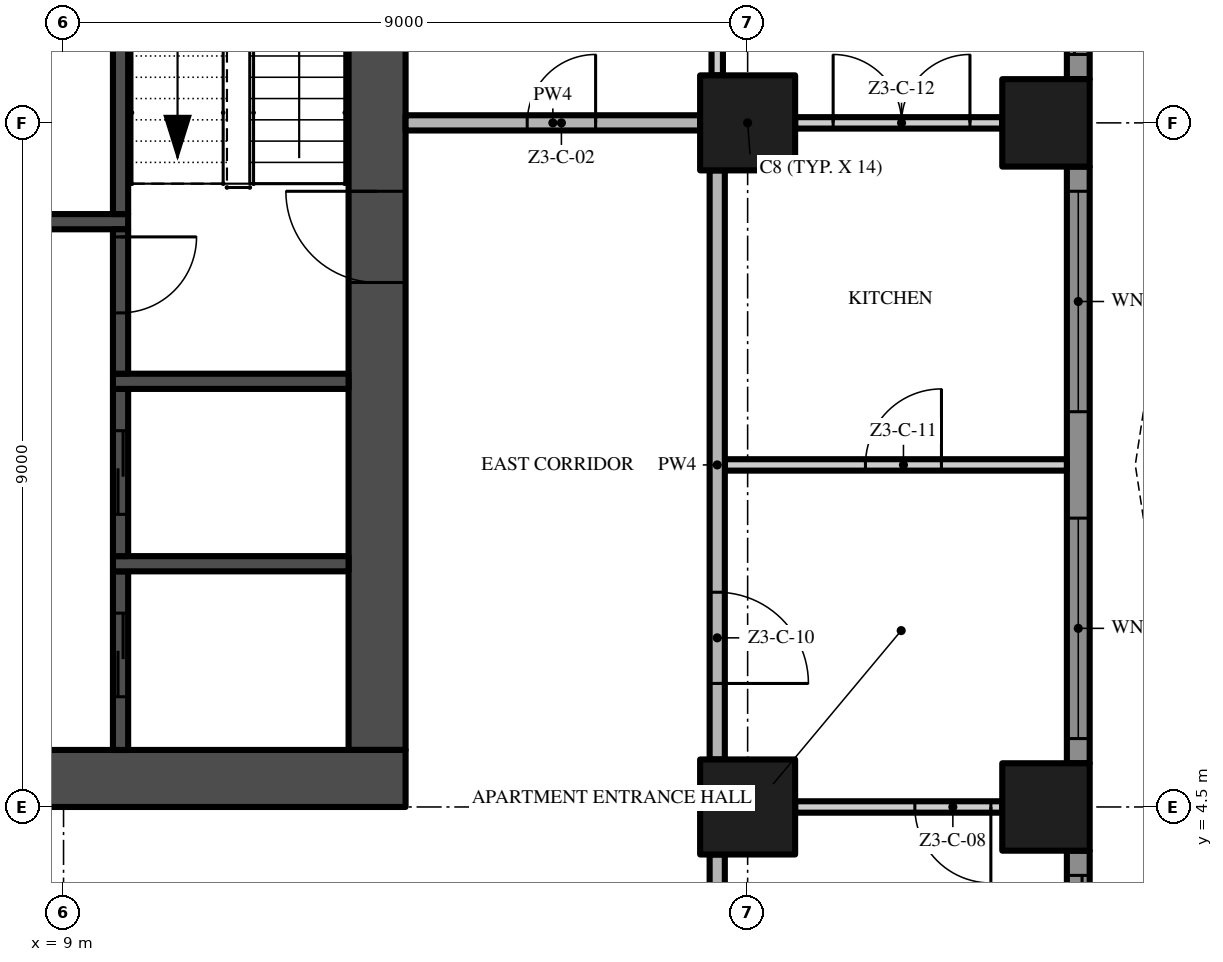
"""IFC4 building model, lengths in metres.
Left out: names, types, materials, properties, quantities, classifications, styles, units other than length and angle.
Written with IfcOpenShell. Run it as: python <this file> out.ifc"""

import sys

from ifc_helpers import new_model, si_unit, direction, frame, frame_2d, origin, origin_2d, place, context, subcontext, project, spatial, polyline, rectangle, outline, extrude, element, fill, save


model = new_model("IFC4")
c1 = context("Model", 3, precision=1e-05, world=origin(), true_north=direction((0.0, 1.0)))
c2 = subcontext(c1, "Body", "Model", "MODEL_VIEW")
j1 = project(units=[si_unit("LENGTHUNIT", "METRE"), si_unit("PLANEANGLEUNIT", "RADIAN")], contexts=[c1])
p1 = place(None, origin())
s1 = spatial("IfcSite", under=j1, at=p1, CompositionType="ELEMENT")
p2 = place(p1, origin())
s2 = spatial("IfcBuilding", under=s1, at=p2, CompositionType="ELEMENT")
p3 = place(p2, frame((0.0, 0.0, 151.6)))
s3 = spatial("IfcBuildingStorey", under=s2, at=p3, CompositionType="ELEMENT", Elevation=151.6)
p4 = place(p3, frame((-13.5, 4.875, -0.3), z_axis=(0.0, 0.0, 1.0), x_axis=(1.0, 0.0, 0.0)))
e1 = element("IfcWall", 1, at=p4, inside=s3, PredefinedType="SHEAR", context=c2, shape_type="SweptSolid", body=[
    extrude(rectangle(XDim=27.0, YDim=0.75, at=frame_2d((13.5, 0.0))), origin(), (0.0, 0.0, 1.0), 3.8),
])
p5 = place(p4, frame((12.0, 0.0, 0.3)))
e2 = element("IfcOpeningElement", 2, at=p5, cuts=e1, PredefinedType="OPENING", context=c2, shape_type="SweptSolid", body=[
    extrude(rectangle(XDim=3.0, YDim=2.4, at=frame_2d((1.5, 1.2))), frame((0.0, 0.385, 0.0), z_axis=(0.0, -1.0, 0.0), x_axis=(1.0, 0.0, 0.0)), (0.0, 0.0, 1.0), 0.77),
])
p6 = place(p4, frame((4.9, 0.0, 0.3)))
e3 = element("IfcOpeningElement", 3, at=p6, cuts=e1, PredefinedType="OPENING", context=c2, shape_type="SweptSolid", body=[
    extrude(rectangle(XDim=1.2, YDim=2.2, at=frame_2d((0.6, 1.1))), frame((0.0, 0.385, 0.0), z_axis=(0.0, -1.0, 0.0), x_axis=(1.0, 0.0, 0.0)), (0.0, 0.0, 1.0), 0.77),
])
p7 = place(p4, frame((20.75, 0.0, 0.3)))
e4 = element("IfcOpeningElement", 4, at=p7, cuts=e1, PredefinedType="OPENING", context=c2, shape_type="SweptSolid", body=[
    extrude(rectangle(XDim=1.5, YDim=2.2, at=frame_2d((0.75, 1.1))), frame((0.0, 0.385, 0.0), z_axis=(0.0, -1.0, 0.0), x_axis=(1.0, 0.0, 0.0)), (0.0, 0.0, 1.0), 0.77),
])
p8 = place(p4, frame((17.4, 0.0, 0.3)))
e5 = element("IfcOpeningElement", 5, at=p8, cuts=e1, PredefinedType="OPENING", context=c2, shape_type="SweptSolid", body=[
    extrude(rectangle(XDim=1.2, YDim=2.2, at=frame_2d((0.6, 1.1))), frame((0.0, 0.385, 0.0), z_axis=(0.0, -1.0, 0.0), x_axis=(1.0, 0.0, 0.0)), (0.0, 0.0, 1.0), 0.77),
])
p9 = place(p3, frame((13.125, 5.25, -0.3), z_axis=(0.0, 0.0, 1.0), x_axis=(0.0, 1.0, 0.0)))
e6 = element("IfcWall", 6, at=p9, inside=s3, PredefinedType="SHEAR", context=c2, shape_type="SweptSolid", body=[
    extrude(rectangle(XDim=16.5, YDim=0.75, at=frame_2d((8.25, 0.0))), origin(), (0.0, 0.0, 1.0), 3.8),
])
p10 = place(p9, frame((6.15, 0.0, 0.3)))
e7 = element("IfcOpeningElement", 7, at=p10, cuts=e6, PredefinedType="OPENING", context=c2, shape_type="SweptSolid", body=[
    extrude(rectangle(XDim=1.2, YDim=2.2, at=frame_2d((0.6, 1.1))), frame((0.0, 0.385, 0.0), z_axis=(0.0, -1.0, 0.0), x_axis=(1.0, 0.0, 0.0)), (0.0, 0.0, 1.0), 0.77),
])
for number, where, z_axis, x_axis in (
    (8, (18.0, 13.5, 0.0), (0.0, 0.0, 1.0), (1.0, 0.0, 0.0)),
    (9, (18.0, 4.5, 0.0), (0.0, 0.0, 1.0), (1.0, 0.0, 0.0)),
):
    element("IfcColumn", number, at=place(p3, frame(where, z_axis=z_axis, x_axis=x_axis)), inside=s3, PredefinedType="COLUMN", context=c2, shape_type="SweptSolid", body=[
        extrude(rectangle(XDim=1.25, YDim=1.25, at=origin_2d()), origin(), (0.0, 0.0, 1.0), 3.5),
    ])
for number, where, z_axis, x_axis in (
    (10, (21.925, 13.5, 0.0), (0.0, 0.0, 1.0), (1.0, 0.0, 0.0)),
    (11, (21.925, 4.5, 0.0), (0.0, 0.0, 1.0), (1.0, 0.0, 0.0)),
):
    element("IfcColumn", number, at=place(p3, frame(where, z_axis=z_axis, x_axis=x_axis)), inside=s3, PredefinedType="COLUMN", context=c2, shape_type="SweptSolid", body=[
        extrude(rectangle(XDim=1.15, YDim=1.15, at=origin_2d()), origin(), (0.0, 0.0, 1.0), 3.5),
    ])
p11 = place(p3, frame((22.35, 3.925, 0.0), z_axis=(0.0, 0.0, 1.0), x_axis=(0.0, -1.0, 0.0)))
e12 = element("IfcWall", 12, at=p11, inside=s3, PredefinedType="SOLIDWALL", context=c2, shape_type="SweptSolid", body=[
    extrude(rectangle(XDim=7.85, YDim=0.3, at=frame_2d((3.925, 0.0))), origin(), (0.0, 0.0, 1.0), 3.5),
])
p12 = place(p11, frame((4.625, 0.0, 0.45)))
e13 = element("IfcOpeningElement", 13, at=p12, cuts=e12, PredefinedType="OPENING", context=c2, shape_type="SweptSolid", body=[
    extrude(rectangle(XDim=2.9, YDim=2.65, at=frame_2d((1.45, 1.325))), frame((0.0, 0.16, 0.0), z_axis=(0.0, -1.0, 0.0), x_axis=(1.0, 0.0, 0.0)), (0.0, 0.0, 1.0), 0.32),
])
p13 = place(p11, frame((0.325, 0.0, 0.0)))
e14 = element("IfcOpeningElement", 14, at=p13, cuts=e12, PredefinedType="OPENING", context=c2, shape_type="SweptSolid", body=[
    extrude(rectangle(XDim=2.9, YDim=2.4, at=frame_2d((1.45, 1.2))), frame((0.0, 0.16, 0.0), z_axis=(0.0, -1.0, 0.0), x_axis=(1.0, 0.0, 0.0)), (0.0, 0.0, 1.0), 0.32),
])
p14 = place(p3, frame((22.35, 12.925, 0.0), z_axis=(0.0, 0.0, 1.0), x_axis=(0.0, -1.0, 0.0)))
e15 = element("IfcWall", 15, at=p14, inside=s3, PredefinedType="SOLIDWALL", context=c2, shape_type="SweptSolid", body=[
    extrude(rectangle(XDim=7.85, YDim=0.3, at=frame_2d((3.925, 0.0))), origin(), (0.0, 0.0, 1.0), 3.5),
])
p15 = place(p14, frame((4.625, 0.0, 0.45)))
e16 = element("IfcOpeningElement", 16, at=p15, cuts=e15, PredefinedType="OPENING", context=c2, shape_type="SweptSolid", body=[
    extrude(rectangle(XDim=2.9, YDim=2.65, at=frame_2d((1.45, 1.325))), frame((0.0, 0.16, 0.0), z_axis=(0.0, -1.0, 0.0), x_axis=(1.0, 0.0, 0.0)), (0.0, 0.0, 1.0), 0.32),
])
p16 = place(p14, frame((0.325, 0.0, 0.45)))
e17 = element("IfcOpeningElement", 17, at=p16, cuts=e15, PredefinedType="OPENING", context=c2, shape_type="SweptSolid", body=[
    extrude(rectangle(XDim=2.9, YDim=2.65, at=frame_2d((1.45, 1.325))), frame((0.0, 0.16, 0.0), z_axis=(0.0, -1.0, 0.0), x_axis=(1.0, 0.0, 0.0)), (0.0, 0.0, 1.0), 0.32),
])
p17 = place(p3, frame((22.35, 18.0, 0.0), z_axis=(0.0, 0.0, 1.0), x_axis=(0.0, -1.0, 0.0)))
e18 = element("IfcWall", 18, at=p17, inside=s3, PredefinedType="SOLIDWALL", context=c2, shape_type="SweptSolid", body=[
    extrude(rectangle(XDim=3.925, YDim=0.3, at=frame_2d((1.962, 0.0))), origin(), (0.0, 0.0, 1.0), 3.5),
])
p18 = place(p17, frame((0.7, 0.0, 0.0)))
e19 = element("IfcOpeningElement", 19, at=p18, cuts=e18, PredefinedType="OPENING", context=c2, shape_type="SweptSolid", body=[
    extrude(rectangle(XDim=2.9, YDim=2.4, at=frame_2d((1.45, 1.2))), frame((0.0, 0.16, 0.0), z_axis=(0.0, -1.0, 0.0), x_axis=(1.0, 0.0, 0.0)), (0.0, 0.0, 1.0), 0.32),
])
p19 = place(p3, origin())
e20 = element("IfcWall", 20, at=p19, inside=s3, PredefinedType="USERDEFINED", context=c2, shape_type="SweptSolid", body=[
    extrude(outline(polyline([(25.5, -13.5), (25.271, -12.0), (24.671, -10.5), (23.929, -9.0), (23.329, -7.5), (23.1, -6.0), (23.329, -4.5), (23.929, -3.0), (24.671, -1.5), (25.271, 0.0), (25.5, 1.5), (25.271, 3.0), (24.671, 4.5), (23.929, 6.0), (23.329, 7.5), (23.1, 9.0), (23.329, 10.5), (23.929, 12.0), (24.671, 13.5), (25.271, 15.0), (25.5, 16.5), (25.271, 18.0), (25.024, 17.962), (25.247, 16.5), (25.028, 15.066), (24.442, 13.602), (23.701, 12.102), (23.086, 10.566), (22.847, 9.0), (23.086, 7.434), (23.701, 5.898), (24.442, 4.398), (25.028, 2.934), (25.247, 1.5), (25.028, 0.066), (24.442, -1.398), (23.701, -2.898), (23.086, -4.434), (22.847, -6.0), (23.086, -7.566), (23.701, -9.102), (24.442, -10.602), (25.028, -12.066), (25.253, -13.538), (25.5, -13.5)])), origin(), (0.0, 0.0, 1.0), 0.9),
])
p20 = place(p3, frame((6.375, 12.2, 0.0), z_axis=(0.0, 0.0, 1.0), x_axis=(1.0, 0.0, 0.0)))
e21 = element("IfcWall", 21, at=p20, inside=s3, PredefinedType="SHEAR", context=c2, shape_type="SweptSolid", body=[
    extrude(rectangle(XDim=3.475, YDim=0.2, at=frame_2d((1.738, 0.0))), origin(), (0.0, 0.0, 1.0), 3.5),
])
p21 = place(p3, frame((9.75, 5.25, 0.0), z_axis=(0.0, 0.0, 1.0), x_axis=(0.0, 1.0, 0.0)))
e22 = element("IfcWall", 22, at=p21, inside=s3, PredefinedType="SHEAR", context=c2, shape_type="SweptSolid", body=[
    extrude(rectangle(XDim=2.35, YDim=0.2, at=frame_2d((1.175, 0.0))), origin(), (0.0, 0.0, 1.0), 3.5),
])
p22 = place(p21, frame((0.7, 0.0, 0.0)))
e23 = element("IfcOpeningElement", 23, at=p22, cuts=e22, PredefinedType="OPENING", context=c2, shape_type="SweptSolid", body=[
    extrude(rectangle(XDim=1.1, YDim=2.1, at=frame_2d((0.55, 1.05))), frame((0.0, 0.11, 0.0), z_axis=(0.0, -1.0, 0.0), x_axis=(1.0, 0.0, 0.0)), (0.0, 0.0, 1.0), 0.22),
])
p23 = place(p3, frame((9.65, 7.7, 0.0), z_axis=(0.0, 0.0, 1.0), x_axis=(1.0, 0.0, 0.0)))
e24 = element("IfcWall", 24, at=p23, inside=s3, PredefinedType="SHEAR", context=c2, shape_type="SweptSolid", body=[
    extrude(rectangle(XDim=3.1, YDim=0.2, at=frame_2d((1.55, 0.0))), origin(), (0.0, 0.0, 1.0), 3.5),
])
p24 = place(p3, frame((9.75, 7.8, 0.0), z_axis=(0.0, 0.0, 1.0), x_axis=(0.0, 1.0, 0.0)))
e25 = element("IfcWall", 25, at=p24, inside=s3, PredefinedType="SHEAR", context=c2, shape_type="SweptSolid", body=[
    extrude(rectangle(XDim=2.2, YDim=0.2, at=frame_2d((1.1, 0.0))), origin(), (0.0, 0.0, 1.0), 3.5),
])
p25 = place(p24, frame((0.55, 0.0, 0.0)))
e26 = element("IfcOpeningElement", 26, at=p25, cuts=e25, PredefinedType="OPENING", context=c2, shape_type="SweptSolid", body=[
    extrude(rectangle(XDim=1.1, YDim=2.1, at=frame_2d((0.55, 1.05))), frame((0.0, 0.11, 0.0), z_axis=(0.0, -1.0, 0.0), x_axis=(1.0, 0.0, 0.0)), (0.0, 0.0, 1.0), 0.22),
])
p26 = place(p3, frame((9.65, 10.1, 0.0), z_axis=(0.0, 0.0, 1.0), x_axis=(1.0, 0.0, 0.0)))
e27 = element("IfcWall", 27, at=p26, inside=s3, PredefinedType="SHEAR", context=c2, shape_type="SweptSolid", body=[
    extrude(rectangle(XDim=3.1, YDim=0.2, at=frame_2d((1.55, 0.0))), origin(), (0.0, 0.0, 1.0), 3.5),
])
p27 = place(p3, frame((9.75, 12.1, 0.0), z_axis=(0.0, 0.0, 1.0), x_axis=(0.0, -1.0, 0.0)))
e28 = element("IfcWall", 28, at=p27, inside=s3, PredefinedType="SHEAR", context=c2, shape_type="SweptSolid", body=[
    extrude(rectangle(XDim=1.9, YDim=0.2, at=frame_2d((0.95, 0.0))), origin(), (0.0, 0.0, 1.0), 3.5),
])
p28 = place(p27, frame((0.1, 0.0, 0.0)))
e29 = element("IfcOpeningElement", 29, at=p28, cuts=e28, PredefinedType="OPENING", context=c2, shape_type="SweptSolid", body=[
    extrude(rectangle(XDim=1.0, YDim=2.2, at=frame_2d((0.5, 1.1))), frame((0.0, 0.11, 0.0), z_axis=(0.0, -1.0, 0.0), x_axis=(1.0, 0.0, 0.0)), (0.0, 0.0, 1.0), 0.22),
])
p29 = place(p3, frame((9.75, 12.3, 0.0), z_axis=(0.0, 0.0, 1.0), x_axis=(0.0, 1.0, 0.0)))
e30 = element("IfcWall", 30, at=p29, inside=s3, PredefinedType="SHEAR", context=c2, shape_type="SweptSolid", body=[
    extrude(rectangle(XDim=3.6, YDim=0.2, at=frame_2d((1.8, 0.0))), origin(), (0.0, 0.0, 1.0), 3.5),
])
p30 = place(p3, frame((21.35, 4.5, 0.0), z_axis=(0.0, 0.0, 1.0), x_axis=(-1.0, 0.0, 0.0)))
e31 = element("IfcWall", 31, at=p30, inside=s3, PredefinedType="PARTITIONING", context=c2, shape_type="SweptSolid", body=[
    extrude(rectangle(XDim=2.725, YDim=0.15, at=frame_2d((1.363, 0.0))), origin(), (0.0, 0.0, 1.0), 3.5),
])
p31 = place(p30, frame((0.15, 0.0, 0.0)))
e32 = element("IfcOpeningElement", 32, at=p31, cuts=e31, PredefinedType="OPENING", context=c2, shape_type="SweptSolid", body=[
    extrude(rectangle(XDim=1.0, YDim=2.4, at=frame_2d((0.5, 1.2))), frame((0.0, 0.085, 0.0), z_axis=(0.0, -1.0, 0.0), x_axis=(1.0, 0.0, 0.0)), (0.0, 0.0, 1.0), 0.17),
])
p32 = place(p3, frame((17.7, 9.0, 0.0), z_axis=(0.0, 0.0, 1.0), x_axis=(1.0, 0.0, 0.0)))
e33 = element("IfcWall", 33, at=p32, inside=s3, PredefinedType="PARTITIONING", context=c2, shape_type="SweptSolid", body=[
    extrude(rectangle(XDim=4.5, YDim=0.15, at=frame_2d((2.25, 0.0))), origin(), (0.0, 0.0, 1.0), 3.5),
])
p33 = place(p32, frame((1.85, 0.0, 0.0)))
e34 = element("IfcOpeningElement", 34, at=p33, cuts=e33, PredefinedType="OPENING", context=c2, shape_type="SweptSolid", body=[
    extrude(rectangle(XDim=1.0, YDim=2.4, at=frame_2d((0.5, 1.2))), frame((0.0, 0.085, 0.0), z_axis=(0.0, -1.0, 0.0), x_axis=(1.0, 0.0, 0.0)), (0.0, 0.0, 1.0), 0.17),
])
p34 = place(p3, frame((13.5, 13.5, 0.0), z_axis=(0.0, 0.0, 1.0), x_axis=(1.0, 0.0, 0.0)))
e35 = element("IfcWall", 35, at=p34, inside=s3, PredefinedType="PARTITIONING", context=c2, shape_type="SweptSolid", body=[
    extrude(rectangle(XDim=3.875, YDim=0.2, at=frame_2d((1.938, 0.0))), origin(), (0.0, 0.0, 1.0), 3.5),
])
p35 = place(p34, frame((1.6, 0.0, 0.0)))
e36 = element("IfcOpeningElement", 36, at=p35, cuts=e35, PredefinedType="OPENING", context=c2, shape_type="SweptSolid", body=[
    extrude(rectangle(XDim=0.9, YDim=2.1, at=frame_2d((0.45, 1.05))), frame((0.0, 0.11, 0.0), z_axis=(0.0, -1.0, 0.0), x_axis=(1.0, 0.0, 0.0)), (0.0, 0.0, 1.0), 0.22),
])
p36 = place(p3, frame((18.625, 13.5, 0.0), z_axis=(0.0, 0.0, 1.0), x_axis=(1.0, 0.0, 0.0)))
e37 = element("IfcWall", 37, at=p36, inside=s3, PredefinedType="PARTITIONING", context=c2, shape_type="SweptSolid", body=[
    extrude(rectangle(XDim=2.725, YDim=0.15, at=frame_2d((1.363, 0.0))), origin(), (0.0, 0.0, 1.0), 3.5),
])
p37 = place(p36, frame((0.5, 0.0, 0.0)))
e38 = element("IfcOpeningElement", 38, at=p37, cuts=e37, PredefinedType="OPENING", context=c2, shape_type="SweptSolid", body=[
    extrude(rectangle(XDim=1.8, YDim=2.4, at=frame_2d((0.9, 1.2))), frame((0.0, 0.085, 0.0), z_axis=(0.0, -1.0, 0.0), x_axis=(1.0, 0.0, 0.0)), (0.0, 0.0, 1.0), 0.17),
])
p38 = place(p3, frame((17.6, -0.2, 0.0), z_axis=(0.0, 0.0, 1.0), x_axis=(0.0, 1.0, 0.0)))
e39 = element("IfcWall", 39, at=p38, inside=s3, PredefinedType="PARTITIONING", context=c2, shape_type="SweptSolid", body=[
    extrude(rectangle(XDim=4.075, YDim=0.2, at=frame_2d((2.038, 0.0))), origin(), (0.0, 0.0, 1.0), 3.5),
])
p39 = place(p3, frame((17.6, 12.875, 0.0), z_axis=(0.0, 0.0, 1.0), x_axis=(0.0, -1.0, 0.0)))
e40 = element("IfcWall", 40, at=p39, inside=s3, PredefinedType="PARTITIONING", context=c2, shape_type="SweptSolid", body=[
    extrude(rectangle(XDim=7.75, YDim=0.2, at=frame_2d((3.875, 0.0))), origin(), (0.0, 0.0, 1.0), 3.5),
])
p40 = place(p39, frame((5.55, 0.0, 0.0)))
e41 = element("IfcOpeningElement", 41, at=p40, cuts=e40, PredefinedType="OPENING", context=c2, shape_type="SweptSolid", body=[
    extrude(rectangle(XDim=1.2, YDim=2.4, at=frame_2d((0.6, 1.2))), frame((0.0, 0.11, 0.0), z_axis=(0.0, -1.0, 0.0), x_axis=(1.0, 0.0, 0.0)), (0.0, 0.0, 1.0), 0.22),
])
p41 = place(p3, frame((17.6, 14.125, 0.0), z_axis=(0.0, 0.0, 1.0), x_axis=(0.0, 1.0, 0.0)))
e42 = element("IfcWall", 42, at=p41, inside=s3, PredefinedType="PARTITIONING", context=c2, shape_type="SweptSolid", body=[
    extrude(rectangle(XDim=3.3, YDim=0.15, at=frame_2d((1.65, 0.0))), origin(), (0.0, 0.0, 1.0), 3.5),
])
p42 = place(p13, origin())
e43 = element("IfcDoor", 43, at=p42, inside=s3, OperationType="SINGLE_SWING_LEFT", PredefinedType="DOOR", context=c2, shape_type="SweptSolid", body=[
    extrude(rectangle(XDim=2.9, YDim=2.4, at=frame_2d((1.45, 1.2))), frame((0.0, 0.025, 0.0), z_axis=(0.0, -1.0, 0.0), x_axis=(1.0, 0.0, 0.0)), (0.0, 0.0, 1.0), 0.05),
])
fill(e14, e43)
p43 = place(p15, origin())
e44 = element("IfcWindow", 44, at=p43, inside=s3, PartitioningType="SINGLE_PANEL", PredefinedType="WINDOW", context=c2, shape_type="SweptSolid", body=[
    extrude(rectangle(XDim=2.9, YDim=2.65, at=frame_2d((1.45, 1.325))), frame((0.0, 0.03, 0.0), z_axis=(0.0, -1.0, 0.0), x_axis=(1.0, 0.0, 0.0)), (0.0, 0.0, 1.0), 0.06),
])
fill(e16, e44)
p44 = place(p16, origin())
e45 = element("IfcWindow", 45, at=p44, inside=s3, PartitioningType="SINGLE_PANEL", PredefinedType="WINDOW", context=c2, shape_type="SweptSolid", body=[
    extrude(rectangle(XDim=2.9, YDim=2.65, at=frame_2d((1.45, 1.325))), frame((0.0, 0.03, 0.0), z_axis=(0.0, -1.0, 0.0), x_axis=(1.0, 0.0, 0.0)), (0.0, 0.0, 1.0), 0.06),
])
fill(e17, e45)
p45 = place(p18, origin())
e46 = element("IfcDoor", 46, at=p45, inside=s3, OperationType="SINGLE_SWING_LEFT", PredefinedType="DOOR", context=c2, shape_type="SweptSolid", body=[
    extrude(rectangle(XDim=2.9, YDim=2.4, at=frame_2d((1.45, 1.2))), frame((0.0, 0.025, 0.0), z_axis=(0.0, -1.0, 0.0), x_axis=(1.0, 0.0, 0.0)), (0.0, 0.0, 1.0), 0.05),
])
fill(e19, e46)
p46 = place(p10, frame((1.2, 0.0, 0.0), z_axis=(0.0, 0.0, 1.0), x_axis=(-1.0, 0.0, 0.0)))
e47 = element("IfcDoor", 47, at=p46, inside=s3, OperationType="SINGLE_SWING_LEFT", PredefinedType="DOOR", context=c2, shape_type="SweptSolid", body=[
    extrude(rectangle(XDim=1.2, YDim=2.2, at=frame_2d((0.6, 1.1))), frame((0.0, 0.025, 0.0), z_axis=(0.0, -1.0, 0.0), x_axis=(1.0, 0.0, 0.0)), (0.0, 0.0, 1.0), 0.05),
])
fill(e7, e47)
p47 = place(p28, origin())
e48 = element("IfcDoor", 48, at=p47, inside=s3, OperationType="SINGLE_SWING_LEFT", PredefinedType="DOOR", context=c2, shape_type="SweptSolid", body=[
    extrude(rectangle(XDim=1.0, YDim=2.2, at=frame_2d((0.5, 1.1))), frame((0.0, 0.025, 0.0), z_axis=(0.0, -1.0, 0.0), x_axis=(1.0, 0.0, 0.0)), (0.0, 0.0, 1.0), 0.05),
])
fill(e29, e48)
p48 = place(p22, origin())
e49 = element("IfcDoor", 49, at=p48, inside=s3, OperationType="SLIDING_TO_RIGHT", PredefinedType="DOOR", context=c2, shape_type="SweptSolid", body=[
    extrude(rectangle(XDim=1.1, YDim=2.1, at=frame_2d((0.55, 1.05))), frame((0.0, 0.025, 0.0), z_axis=(0.0, -1.0, 0.0), x_axis=(1.0, 0.0, 0.0)), (0.0, 0.0, 1.0), 0.05),
])
fill(e23, e49)
p49 = place(p25, origin())
e50 = element("IfcDoor", 50, at=p49, inside=s3, OperationType="SLIDING_TO_RIGHT", PredefinedType="DOOR", context=c2, shape_type="SweptSolid", body=[
    extrude(rectangle(XDim=1.1, YDim=2.1, at=frame_2d((0.55, 1.05))), frame((0.0, 0.025, 0.0), z_axis=(0.0, -1.0, 0.0), x_axis=(1.0, 0.0, 0.0)), (0.0, 0.0, 1.0), 0.05),
])
fill(e26, e50)
p50 = place(p35, origin())
e51 = element("IfcDoor", 51, at=p50, inside=s3, OperationType="SINGLE_SWING_RIGHT", PredefinedType="DOOR", context=c2, shape_type="SweptSolid", body=[
    extrude(rectangle(XDim=0.9, YDim=2.1, at=frame_2d((0.45, 1.05))), frame((0.0, 0.025, 0.0), z_axis=(0.0, -1.0, 0.0), x_axis=(1.0, 0.0, 0.0)), (0.0, 0.0, 1.0), 0.05),
])
fill(e36, e51)
p51 = place(p31, origin())
e52 = element("IfcDoor", 52, at=p51, inside=s3, OperationType="SINGLE_SWING_LEFT", PredefinedType="DOOR", context=c2, shape_type="SweptSolid", body=[
    extrude(rectangle(XDim=1.0, YDim=2.4, at=frame_2d((0.5, 1.2))), frame((0.0, 0.025, 0.0), z_axis=(0.0, -1.0, 0.0), x_axis=(1.0, 0.0, 0.0)), (0.0, 0.0, 1.0), 0.05),
])
fill(e32, e52)
p52 = place(p40, origin())
e53 = element("IfcDoor", 53, at=p52, inside=s3, OperationType="SINGLE_SWING_RIGHT", PredefinedType="DOOR", context=c2, shape_type="SweptSolid", body=[
    extrude(rectangle(XDim=1.2, YDim=2.4, at=frame_2d((0.6, 1.2))), frame((0.0, 0.025, 0.0), z_axis=(0.0, -1.0, 0.0), x_axis=(1.0, 0.0, 0.0)), (0.0, 0.0, 1.0), 0.05),
])
fill(e41, e53)
p53 = place(p33, origin())
e54 = element("IfcDoor", 54, at=p53, inside=s3, OperationType="SINGLE_SWING_RIGHT", PredefinedType="DOOR", context=c2, shape_type="SweptSolid", body=[
    extrude(rectangle(XDim=1.0, YDim=2.4, at=frame_2d((0.5, 1.2))), frame((0.0, 0.025, 0.0), z_axis=(0.0, -1.0, 0.0), x_axis=(1.0, 0.0, 0.0)), (0.0, 0.0, 1.0), 0.05),
])
fill(e34, e54)
p54 = place(p37, origin())
e55 = element("IfcDoor", 55, at=p54, inside=s3, OperationType="DOUBLE_DOOR_SINGLE_SWING", PredefinedType="DOOR", context=c2, shape_type="SweptSolid", body=[
    extrude(rectangle(XDim=1.8, YDim=2.4, at=frame_2d((0.9, 1.2))), frame((0.0, 0.025, 0.0), z_axis=(0.0, -1.0, 0.0), x_axis=(1.0, 0.0, 0.0)), (0.0, 0.0, 1.0), 0.05),
])
fill(e38, e55)
save(model, sys.argv[1])
